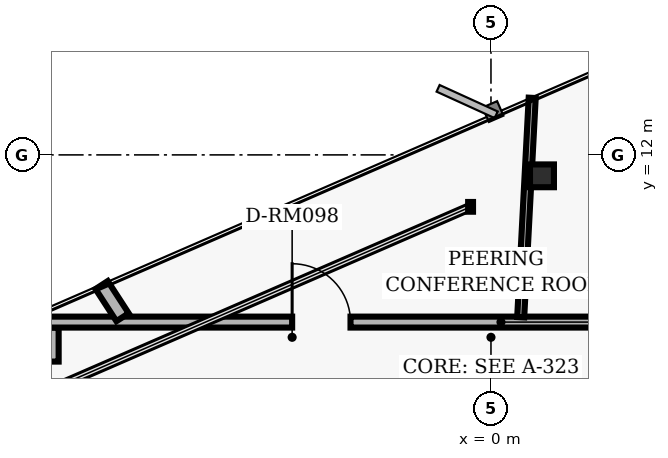
"""IFC4 building model, lengths in metres.
Left out: names, types, materials, properties, quantities, classifications, styles, units other than length and angle.
Written with IfcOpenShell. Run it as: python <this file> out.ifc"""

import sys

from ifc_helpers import new_model, si_unit, direction, frame, frame_2d, origin, origin_2d, place, context, subcontext, project, spatial, rectangle, i_section, extrude, element, fill, save


model = new_model("IFC4")
c1 = context("Model", 3, precision=1e-05, world=origin(), true_north=direction((0.0, 1.0)))
c2 = subcontext(c1, "Body", "Model", "MODEL_VIEW")
j1 = project(units=[si_unit("LENGTHUNIT", "METRE"), si_unit("PLANEANGLEUNIT", "RADIAN")], contexts=[c1])
p1 = place(None, origin())
s1 = spatial("IfcSite", under=j1, at=p1, CompositionType="ELEMENT")
p2 = place(p1, origin())
s2 = spatial("IfcBuilding", under=s1, at=p2, CompositionType="ELEMENT")
p3 = place(p2, frame((0.0, 0.0, 224.0)))
s3 = spatial("IfcBuildingStorey", under=s2, at=p3, CompositionType="ELEMENT", Elevation=224.0)
p4 = place(p3, frame((0.838, 11.656, 0.0), z_axis=(0.0, 0.0, 1.0), x_axis=(1.0, 0.0, 0.0)))
e1 = element("IfcColumn", 1, at=p4, inside=s3, PredefinedType="COLUMN", context=c2, shape_type="SweptSolid", body=[
    extrude(i_section(OverallWidth=0.394, OverallDepth=0.375, WebThickness=0.017, FlangeThickness=0.028, FilletRadius=0.016, at=origin_2d()), origin(), (0.0, 0.0, 1.0), 3.04),
])
p5 = place(p3, frame((-7.2, 8.601, 0.0), z_axis=(0.0, 0.0, 1.0), x_axis=(0.0, 1.0, 0.0)))
e2 = element("IfcWall", 2, at=p5, inside=s3, PredefinedType="PARTITIONING", context=c2, shape_type="SweptSolid", body=[
    extrude(rectangle(XDim=0.559, YDim=0.18, at=frame_2d((0.28, 0.0))), origin(), (0.0, 0.0, 1.0), 2.773),
])
p6 = place(p3, frame((-7.29, 9.25, 0.0), z_axis=(0.0, 0.0, 1.0), x_axis=(1.0, 0.0, 0.0)))
e3 = element("IfcWall", 3, at=p6, inside=s3, PredefinedType="PARTITIONING", context=c2, shape_type="SweptSolid", body=[
    extrude(rectangle(XDim=13.3, YDim=0.18, at=frame_2d((6.65, 0.0))), origin(), (0.0, 0.0, 1.0), 2.395),
])
p7 = place(p6, frame((9.929, 0.0, 0.0)))
e4 = element("IfcOpeningElement", 4, at=p7, cuts=e3, PredefinedType="OPENING", context=c2, shape_type="SweptSolid", body=[
    extrude(rectangle(XDim=0.96, YDim=2.02, at=frame_2d((0.48, 1.01))), frame((0.0, 0.1, 0.0), z_axis=(0.0, -1.0, 0.0), x_axis=(1.0, 0.0, 0.0)), (0.0, 0.0, 1.0), 0.2),
])
p8 = place(p6, frame((4.02, 0.0, 0.0)))
e5 = element("IfcOpeningElement", 5, at=p8, cuts=e3, PredefinedType="OPENING", context=c2, shape_type="SweptSolid", body=[
    extrude(rectangle(XDim=0.96, YDim=2.02, at=frame_2d((0.48, 1.01))), frame((0.0, 0.1, 0.0), z_axis=(0.0, -1.0, 0.0), x_axis=(1.0, 0.0, 0.0)), (0.0, 0.0, 1.0), 0.2),
])
p9 = place(p3, frame((0.489, 9.33, 0.0), z_axis=(0.0, 0.0, 1.0), x_axis=(0.05229993373, 0.998631421963, 0.0)))
e6 = element("IfcWall", 6, at=p9, inside=s3, PredefinedType="MOVABLE", context=c2, shape_type="SweptSolid", body=[
    extrude(rectangle(XDim=3.613, YDim=0.115, at=frame_2d((1.807, 0.0))), origin(), (0.0, 0.0, 1.0), 2.773),
])
p10 = place(p3, frame((-6.059, 9.33, 0.0), z_axis=(0.0, 0.0, 1.0), x_axis=(-0.54466198204, 0.838655665527, 0.0)))
e7 = element("IfcWall", 7, at=p10, inside=s3, PredefinedType="PARTITIONING", context=c2, shape_type="SweptSolid", body=[
    extrude(rectangle(XDim=0.631, YDim=0.24, at=frame_2d((0.315, 0.0))), origin(), (0.0, 0.0, 1.0), 2.773),
])
p11 = place(p8, origin())
e8 = element("IfcDoor", 8, at=p11, inside=s3, OperationType="SINGLE_SWING_LEFT", PredefinedType="DOOR", context=c2, shape_type="SweptSolid", body=[
    extrude(rectangle(XDim=0.96, YDim=2.02, at=frame_2d((0.48, 1.01))), frame((0.0, 0.025, 0.0), z_axis=(0.0, -1.0, 0.0), x_axis=(1.0, 0.0, 0.0)), (0.0, 0.0, 1.0), 0.05),
])
fill(e5, e8)
save(model, sys.argv[1])
